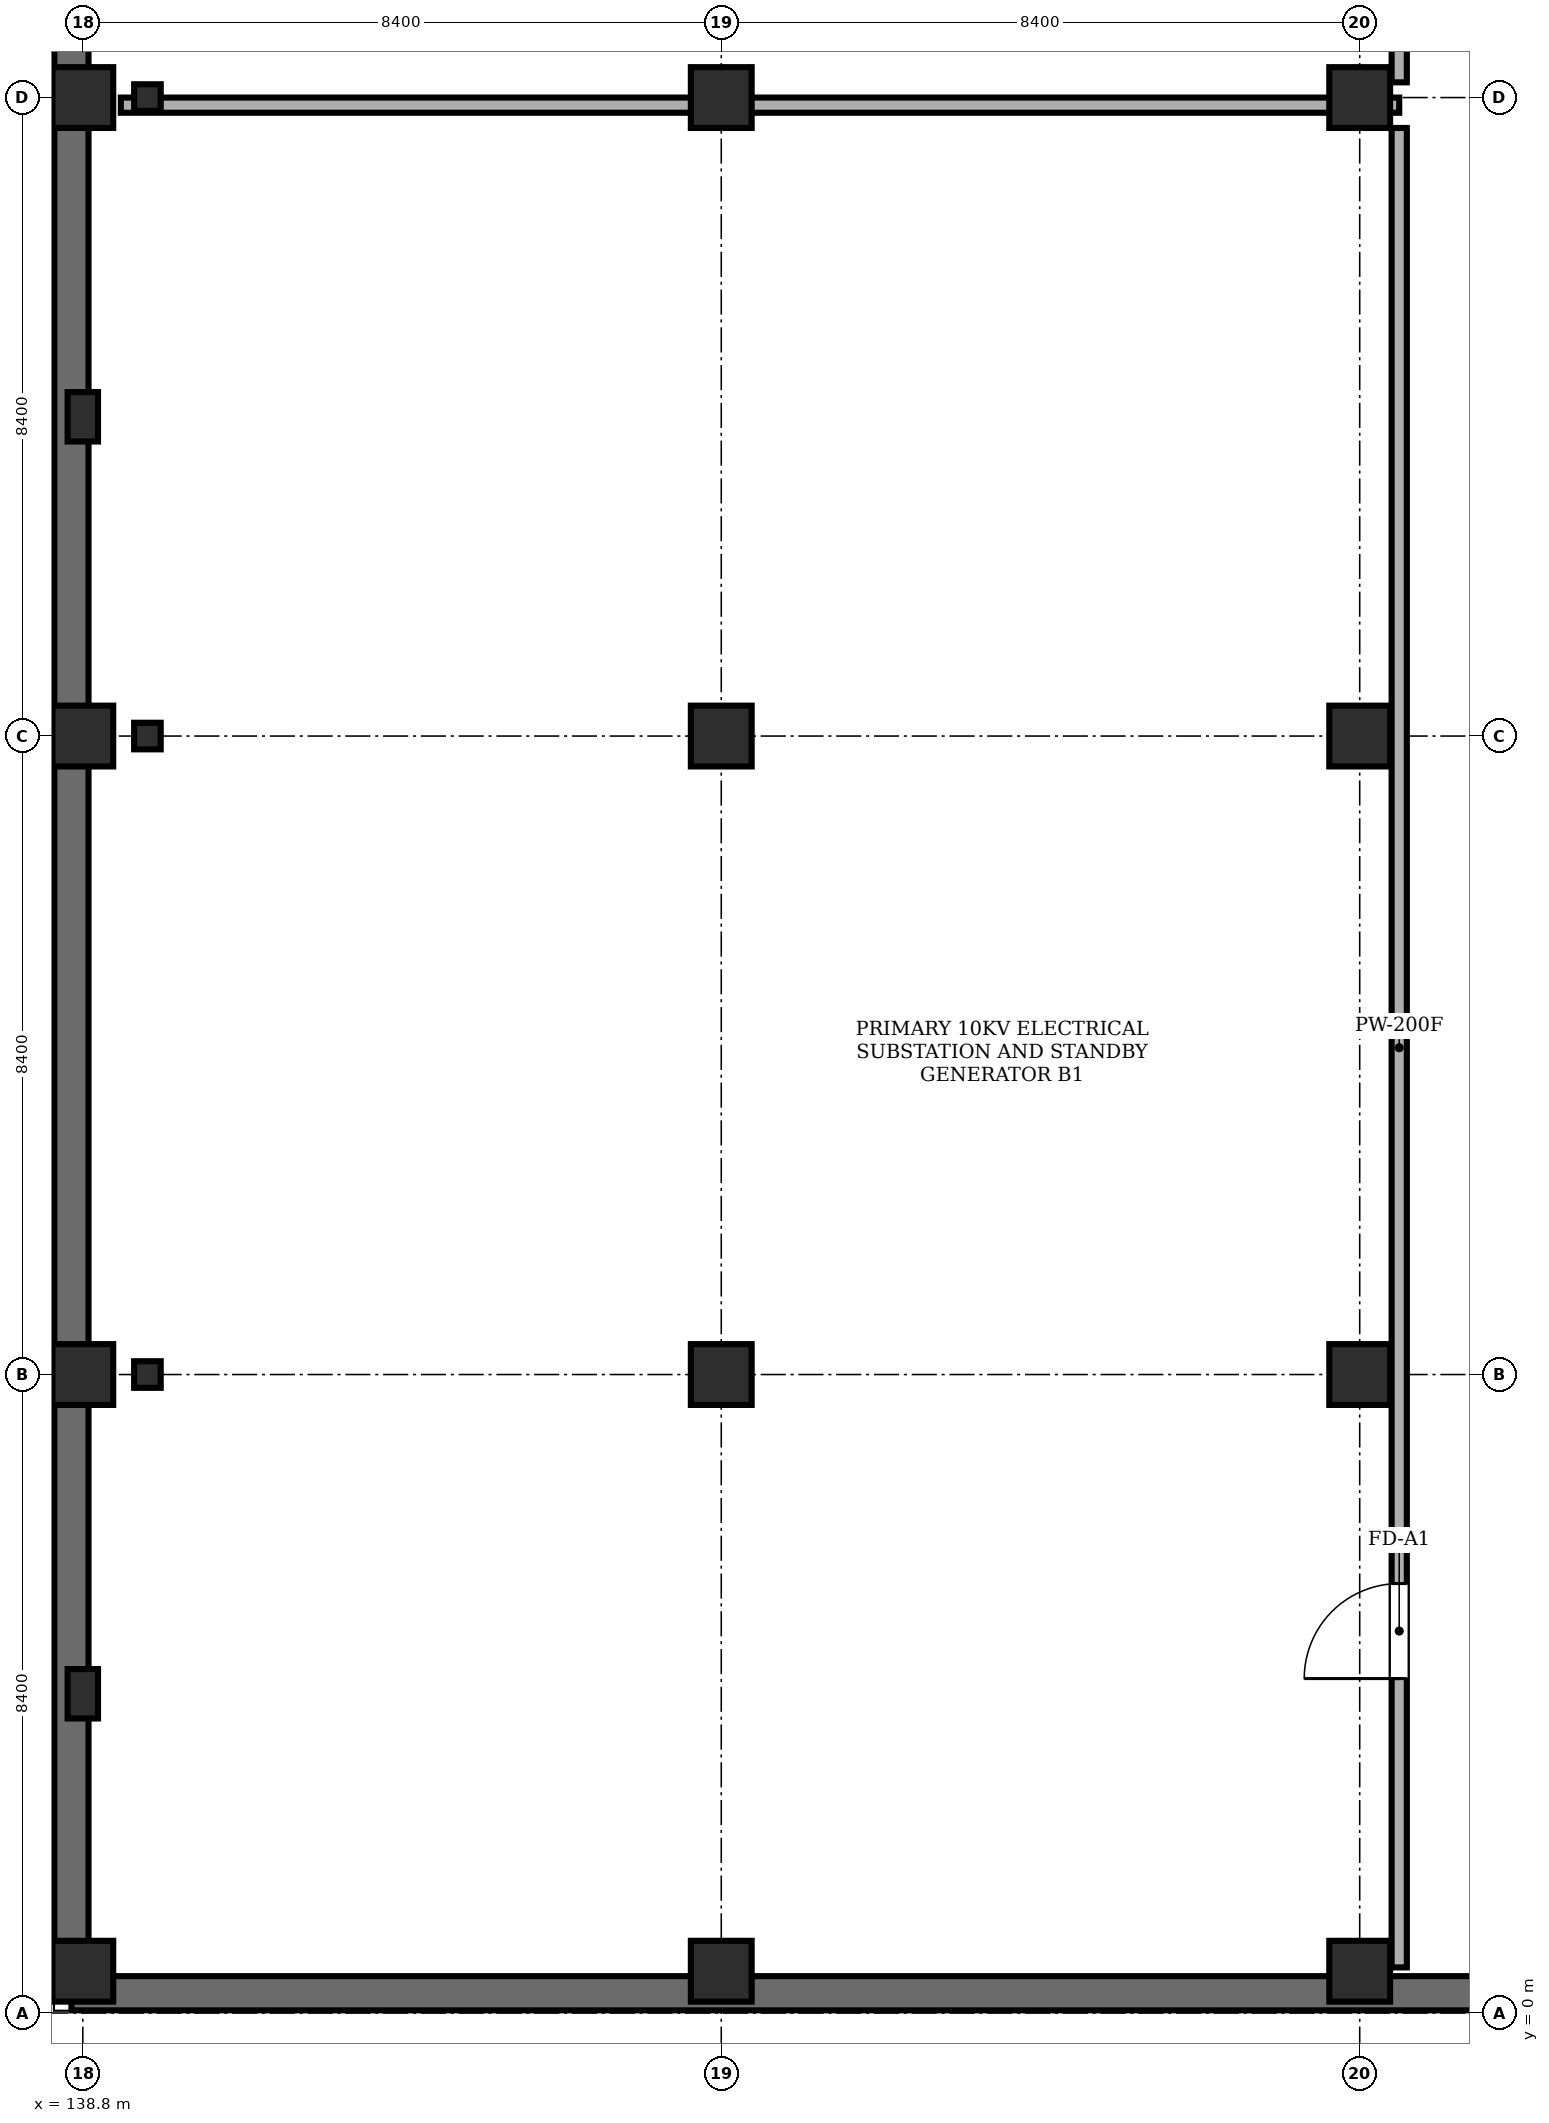
"""IFC4 building model, lengths in metres.
Left out: names, types, materials, properties, quantities, classifications, styles, units other than length and angle.
Written with IfcOpenShell. Run it as: python <this file> out.ifc"""

import sys

from ifc_helpers import new_model, si_unit, direction, frame, frame_2d, origin, origin_2d, place, context, subcontext, project, spatial, rectangle, i_section, extrude, element, fill, save


model = new_model("IFC4")
c1 = context("Model", 3, precision=1e-05, world=origin(), true_north=direction((0.0, 1.0)))
c2 = subcontext(c1, "Body", "Model", "MODEL_VIEW")
j1 = project(units=[si_unit("LENGTHUNIT", "METRE"), si_unit("PLANEANGLEUNIT", "RADIAN")], contexts=[c1])
p1 = place(None, origin())
s1 = spatial("IfcSite", under=j1, at=p1, CompositionType="ELEMENT")
p2 = place(p1, origin())
s2 = spatial("IfcBuilding", under=s1, at=p2, CompositionType="ELEMENT")
p3 = place(p2, frame((0.0, 0.0, -4.8)))
s3 = spatial("IfcBuildingStorey", under=s2, at=p3, CompositionType="ELEMENT", Elevation=-4.8)
for number, where, z_axis, x_axis in (
    (1, (138.8, 0.55, 0.0), (0.0, 0.0, 1.0), (1.0, 0.0, 0.0)),
    (2, (138.8, 8.4, 0.0), (0.0, 0.0, 1.0), (1.0, 0.0, 0.0)),
    (3, (138.8, 16.8, 0.0), (0.0, 0.0, 1.0), (1.0, 0.0, 0.0)),
    (4, (138.8, 25.2, 0.0), (0.0, 0.0, 1.0), (1.0, 0.0, 0.0)),
    (5, (147.2, 0.55, 0.0), (0.0, 0.0, 1.0), (1.0, 0.0, 0.0)),
    (6, (147.2, 8.4, 0.0), (0.0, 0.0, 1.0), (1.0, 0.0, 0.0)),
    (7, (147.2, 16.8, 0.0), (0.0, 0.0, 1.0), (1.0, 0.0, 0.0)),
    (8, (147.2, 25.2, 0.0), (0.0, 0.0, 1.0), (1.0, 0.0, 0.0)),
    (9, (155.6, 0.55, 0.0), (0.0, 0.0, 1.0), (1.0, 0.0, 0.0)),
    (10, (155.6, 8.4, 0.0), (0.0, 0.0, 1.0), (1.0, 0.0, 0.0)),
    (11, (155.6, 16.8, 0.0), (0.0, 0.0, 1.0), (1.0, 0.0, 0.0)),
    (12, (155.6, 25.2, 0.0), (0.0, 0.0, 1.0), (1.0, 0.0, 0.0)),
):
    element("IfcColumn", number, at=place(p3, frame(where, z_axis=z_axis, x_axis=x_axis)), inside=s3, PredefinedType="COLUMN", context=c2, shape_type="SweptSolid", body=[
        extrude(rectangle(XDim=0.8, YDim=0.8, at=origin_2d()), origin(), (0.0, 0.0, 1.0), 4.395),
    ])
for number, where, z_axis, x_axis in (
    (13, (138.8, 4.2, 0.0), (0.0, 0.0, 1.0), (1.0, 0.0, 0.0)),
    (14, (138.8, 21.0, 0.0), (0.0, 0.0, 1.0), (1.0, 0.0, 0.0)),
):
    element("IfcColumn", number, at=place(p3, frame(where, z_axis=z_axis, x_axis=x_axis)), inside=s3, PredefinedType="PILASTER", context=c2, shape_type="SweptSolid", body=[
        extrude(rectangle(XDim=0.4, YDim=0.65, at=origin_2d()), origin(), (0.0, 0.0, 1.0), 4.395),
    ])
p4 = place(p3, frame((138.65, 78.25, 0.0), z_axis=(0.0, 0.0, 1.0), x_axis=(0.0, -1.0, 0.0)))
e15 = element("IfcWall", 15, at=p4, inside=s3, PredefinedType="SHEAR", context=c2, shape_type="SweptSolid", body=[
    extrude(rectangle(XDim=77.99, YDim=0.45, at=frame_2d((38.995, 0.0))), origin(), (0.0, 0.0, 1.0), 3.75),
])
p5 = place(p3, frame((138.65, 0.26, 0.0), z_axis=(0.0, 0.0, 1.0), x_axis=(1.0, 0.0, 0.0)))
e16 = element("IfcWall", 16, at=p5, inside=s3, PredefinedType="SHEAR", context=c2, shape_type="SweptSolid", body=[
    extrude(rectangle(XDim=25.09, YDim=0.45, at=frame_2d((12.545, 0.0))), origin(), (0.0, 0.0, 1.0), 3.75),
])
for number, where, z_axis, x_axis in (
    (17, (139.65, 8.4, 0.0), (0.0, 0.0, 1.0), (1.0, 0.0, 0.0)),
    (18, (139.65, 16.8, 0.0), (0.0, 0.0, 1.0), (1.0, 0.0, 0.0)),
    (19, (139.65, 25.2, 0.0), (0.0, 0.0, 1.0), (1.0, 0.0, 0.0)),
):
    element("IfcColumn", number, at=place(p3, frame(where, z_axis=z_axis, x_axis=x_axis)), inside=s3, PredefinedType="COLUMN", context=c2, shape_type="SweptSolid", body=[
        extrude(i_section(OverallWidth=0.35, OverallDepth=0.35, WebThickness=0.012, FlangeThickness=0.019, at=origin_2d()), origin(), (0.0, 0.0, 1.0), 4.395),
    ])
p6 = place(p3, frame((156.12, 0.6, 0.0), z_axis=(0.0, 0.0, 1.0), x_axis=(0.0, 1.0, 0.0)))
e20 = element("IfcWall", 20, at=p6, inside=s3, PredefinedType="SOLIDWALL", context=c2, shape_type="SweptSolid", body=[
    extrude(rectangle(XDim=24.2, YDim=0.2, at=frame_2d((12.1, 0.0))), origin(), (0.0, 0.0, 1.0), 4.395),
])
p7 = place(p6, frame((3.8, 0.0, 0.0)))
e21 = element("IfcOpeningElement", 21, at=p7, cuts=e20, PredefinedType="OPENING", context=c2, shape_type="SweptSolid", body=[
    extrude(rectangle(XDim=1.25, YDim=2.2, at=frame_2d((0.625, 1.1))), frame((0.0, 0.11, 0.0), z_axis=(0.0, -1.0, 0.0), x_axis=(1.0, 0.0, 0.0)), (0.0, 0.0, 1.0), 0.22),
])
p8 = place(p3, frame((156.12, 25.4, 0.0), z_axis=(0.0, 0.0, 1.0), x_axis=(0.0, 1.0, 0.0)))
e22 = element("IfcWall", 22, at=p8, inside=s3, PredefinedType="SOLIDWALL", context=c2, shape_type="SweptSolid", body=[
    extrude(rectangle(XDim=16.2, YDim=0.2, at=frame_2d((8.1, 0.0))), origin(), (0.0, 0.0, 1.0), 4.395),
])
p9 = place(p8, frame((3.8, 0.0, 0.0)))
e23 = element("IfcOpeningElement", 23, at=p9, cuts=e22, PredefinedType="OPENING", context=c2, shape_type="SweptSolid", body=[
    extrude(rectangle(XDim=1.5, YDim=2.2, at=frame_2d((0.75, 1.1))), frame((0.0, 0.11, 0.0), z_axis=(0.0, -1.0, 0.0), x_axis=(1.0, 0.0, 0.0)), (0.0, 0.0, 1.0), 0.22),
])
p10 = place(p3, frame((139.3, 25.1, 0.0), z_axis=(0.0, 0.0, 1.0), x_axis=(1.0, 0.0, 0.0)))
e24 = element("IfcWall", 24, at=p10, inside=s3, PredefinedType="SOLIDWALL", context=c2, shape_type="SweptSolid", body=[
    extrude(rectangle(XDim=16.82, YDim=0.2, at=frame_2d((8.41, 0.0))), origin(), (0.0, 0.0, 1.0), 3.595),
])
p11 = place(p7, origin())
e25 = element("IfcDoor", 25, at=p11, inside=s3, OperationType="SINGLE_SWING_LEFT", PredefinedType="DOOR", context=c2, shape_type="SweptSolid", body=[
    extrude(rectangle(XDim=1.25, YDim=2.2, at=frame_2d((0.625, 1.1))), frame((0.0, 0.025, 0.0), z_axis=(0.0, -1.0, 0.0), x_axis=(1.0, 0.0, 0.0)), (0.0, 0.0, 1.0), 0.05),
])
fill(e21, e25)
save(model, sys.argv[1])
